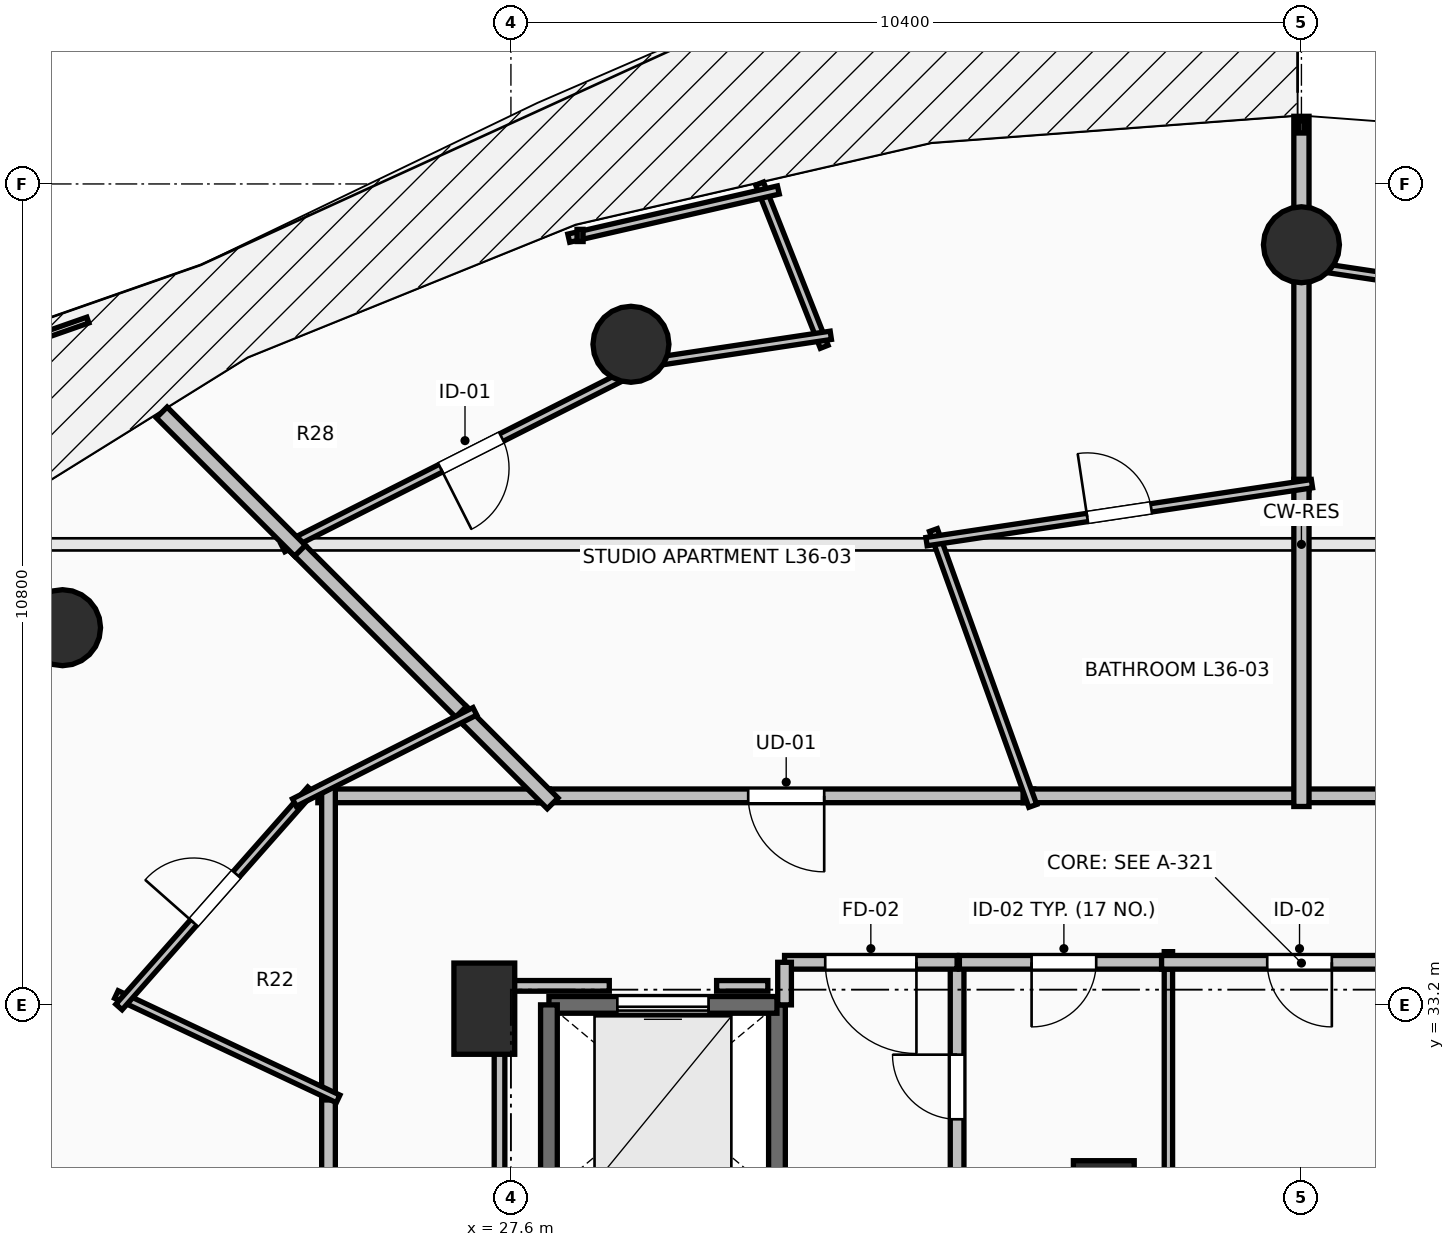
"""IFC4 building model, lengths in metres.
Left out: names, types, materials, properties, quantities, classifications, styles, units other than length and angle.
Written with IfcOpenShell. Run it as: python <this file> out.ifc"""

import sys

from ifc_helpers import new_model, si_unit, direction, frame, frame_2d, origin, origin_2d, place, context, subcontext, project, spatial, rectangle, circle, extrude, element, fill, save


model = new_model("IFC4")
c1 = context("Model", 3, precision=1e-05, world=origin(), true_north=direction((0.0, 1.0)))
c2 = subcontext(c1, "Body", "Model", "MODEL_VIEW")
j1 = project(units=[si_unit("LENGTHUNIT", "METRE"), si_unit("PLANEANGLEUNIT", "RADIAN")], contexts=[c1])
p1 = place(None, origin())
s1 = spatial("IfcSite", under=j1, at=p1, CompositionType="ELEMENT")
p2 = place(p1, origin())
s2 = spatial("IfcBuilding", under=s1, at=p2, CompositionType="ELEMENT")
p3 = place(p2, frame((0.0, 0.0, 136.1)))
s3 = spatial("IfcBuildingStorey", under=s2, at=p3, CompositionType="ELEMENT", Elevation=136.1)
for number, where, z_axis, x_axis in (
    (1, (38.0, 43.2, 0.0), (0.0, 0.0, 1.0), (0.0, 1.0, 0.0)),
    (2, (29.179, 41.891, 0.0), (0.0, 0.0, 1.0), (-0.383, 0.924, 0.0)),
    (3, (21.701, 38.162, 0.0), (0.0, 0.0, 1.0), (-0.707, 0.707, 0.0)),
):
    element("IfcColumn", number, at=place(p3, frame(where, z_axis=z_axis, x_axis=x_axis)), inside=s3, PredefinedType="COLUMN", context=c2, shape_type="SweptSolid", body=[
        extrude(circle(Radius=0.5, at=origin_2d()), origin(), (0.0, 0.0, 1.0), 3.5),
    ])
for number, where, z_axis, x_axis in (
    (4, (27.25, 33.15, 0.0), (0.0, 0.0, 1.0), (1.0, 0.0, 0.0)),
    (5, (35.4, 30.55, 0.0), (0.0, 0.0, 1.0), (1.0, 0.0, 0.0)),
):
    element("IfcColumn", number, at=place(p3, frame(where, z_axis=z_axis, x_axis=x_axis)), inside=s3, PredefinedType="PILASTER", context=c2, shape_type="SweptSolid", body=[
        extrude(rectangle(XDim=0.8, YDim=1.2, at=origin_2d()), origin(), (0.0, 0.0, 1.0), 3.5),
    ])
p4 = place(p3, frame((31.1, 30.7, 0.0), z_axis=(0.0, 0.0, 1.0), x_axis=(0.0, 1.0, 0.0)))
e6 = element("IfcWall", 6, at=p4, inside=s3, PredefinedType="SOLIDWALL", context=c2, shape_type="SweptSolid", body=[
    extrude(rectangle(XDim=2.5, YDim=0.22, at=frame_2d((1.25, 0.0))), origin(), (0.0, 0.0, 1.0), 3.24),
])
p5 = place(p3, frame((31.1, 33.2, 0.0), z_axis=(0.0, 0.0, 1.0), x_axis=(-1.0, 0.0, 0.0)))
e7 = element("IfcWall", 7, at=p5, inside=s3, PredefinedType="SOLIDWALL", context=c2, shape_type="SweptSolid", body=[
    extrude(rectangle(XDim=3.0, YDim=0.22, at=frame_2d((1.5, 0.0))), origin(), (0.0, 0.0, 1.0), 3.24),
])
p6 = place(p5, frame((0.9, 0.0, 0.0)))
e8 = element("IfcOpeningElement", 8, at=p6, cuts=e7, PredefinedType="OPENING", context=c2, shape_type="SweptSolid", body=[
    extrude(rectangle(XDim=1.2, YDim=2.2, at=frame_2d((0.6, 1.1))), frame((0.0, 0.125, 0.0), z_axis=(0.0, -1.0, 0.0), x_axis=(1.0, 0.0, 0.0)), (0.0, 0.0, 1.0), 0.25),
])
p7 = place(p3, frame((28.1, 33.2, 0.0), z_axis=(0.0, 0.0, 1.0), x_axis=(0.0, -1.0, 0.0)))
e9 = element("IfcWall", 9, at=p7, inside=s3, PredefinedType="SOLIDWALL", context=c2, shape_type="SweptSolid", body=[
    extrude(rectangle(XDim=2.5, YDim=0.22, at=frame_2d((1.25, 0.0))), origin(), (0.0, 0.0, 1.0), 3.24),
])
p8 = place(p3, frame((33.47, 30.48, 0.0), z_axis=(0.0, 0.0, 1.0), x_axis=(0.0, 1.0, 0.0)))
e10 = element("IfcWall", 10, at=p8, inside=s3, PredefinedType="PARTITIONING", context=c2, shape_type="SweptSolid", body=[
    extrude(rectangle(XDim=3.28, YDim=0.18, at=frame_2d((1.64, 0.0))), origin(), (0.0, 0.0, 1.0), 3.24),
])
p9 = place(p8, frame((1.215, 0.0, 0.0)))
e11 = element("IfcOpeningElement", 11, at=p9, cuts=e10, PredefinedType="OPENING", context=c2, shape_type="SweptSolid", body=[
    extrude(rectangle(XDim=0.85, YDim=2.1, at=frame_2d((0.425, 1.05))), frame((0.0, 0.105, 0.0), z_axis=(0.0, -1.0, 0.0), x_axis=(1.0, 0.0, 0.0)), (0.0, 0.0, 1.0), 0.21),
])
p10 = place(p3, frame((33.47, 33.76, 0.0), z_axis=(0.0, 0.0, 1.0), x_axis=(-1.0, 0.0, 0.0)))
e12 = element("IfcWall", 12, at=p10, inside=s3, PredefinedType="PARTITIONING", context=c2, shape_type="SweptSolid", body=[
    extrude(rectangle(XDim=2.27, YDim=0.18, at=frame_2d((1.135, 0.0))), origin(), (0.0, 0.0, 1.0), 3.24),
])
p11 = place(p10, frame((0.535, 0.0, 0.0)))
e13 = element("IfcOpeningElement", 13, at=p11, cuts=e12, PredefinedType="OPENING", context=c2, shape_type="SweptSolid", body=[
    extrude(rectangle(XDim=1.2, YDim=2.15, at=frame_2d((0.6, 1.075))), frame((0.0, 0.105, 0.0), z_axis=(0.0, -1.0, 0.0), x_axis=(1.0, 0.0, 0.0)), (0.0, 0.0, 1.0), 0.21),
])
p12 = place(p3, frame((31.2, 33.76, 0.0), z_axis=(0.0, 0.0, 1.0), x_axis=(0.0, -1.0, 0.0)))
e14 = element("IfcWall", 14, at=p12, inside=s3, PredefinedType="PARTITIONING", context=c2, shape_type="SweptSolid", body=[
    extrude(rectangle(XDim=0.56, YDim=0.18, at=frame_2d((0.28, 0.0))), origin(), (0.0, 0.0, 1.0), 3.24),
])
p13 = place(p3, frame((36.25, 30.34, 0.0), z_axis=(0.0, 0.0, 1.0), x_axis=(0.0, 1.0, 0.0)))
e15 = element("IfcWall", 15, at=p13, inside=s3, PredefinedType="PARTITIONING", context=c2, shape_type="SweptSolid", body=[
    extrude(rectangle(XDim=3.56, YDim=0.11, at=frame_2d((1.78, 0.0))), origin(), (0.0, 0.0, 1.0), 2.432),
])
p14 = place(p3, frame((36.25, 33.76, 0.0), z_axis=(0.0, 0.0, 1.0), x_axis=(-1.0, 0.0, 0.0)))
e16 = element("IfcWall", 16, at=p14, inside=s3, PredefinedType="PARTITIONING", context=c2, shape_type="SweptSolid", body=[
    extrude(rectangle(XDim=2.75, YDim=0.18, at=frame_2d((1.375, 0.0))), origin(), (0.0, 0.0, 1.0), 3.24),
])
p15 = place(p14, frame((0.95, 0.0, 0.0)))
e17 = element("IfcOpeningElement", 17, at=p15, cuts=e16, PredefinedType="OPENING", context=c2, shape_type="SweptSolid", body=[
    extrude(rectangle(XDim=0.85, YDim=2.1, at=frame_2d((0.425, 1.05))), frame((0.0, 0.105, 0.0), z_axis=(0.0, -1.0, 0.0), x_axis=(1.0, 0.0, 0.0)), (0.0, 0.0, 1.0), 0.21),
])
p16 = place(p3, frame((39.79, 33.76, 0.0), z_axis=(0.0, 0.0, 1.0), x_axis=(-1.0, 0.0, 0.0)))
e18 = element("IfcWall", 18, at=p16, inside=s3, PredefinedType="PARTITIONING", context=c2, shape_type="SweptSolid", body=[
    extrude(rectangle(XDim=3.63, YDim=0.18, at=frame_2d((1.815, 0.0))), origin(), (0.0, 0.0, 1.0), 3.24),
])
p17 = place(p16, frame((1.39, 0.0, 0.0)))
e19 = element("IfcOpeningElement", 19, at=p17, cuts=e18, PredefinedType="OPENING", context=c2, shape_type="SweptSolid", body=[
    extrude(rectangle(XDim=0.85, YDim=2.1, at=frame_2d((0.425, 1.05))), frame((0.0, 0.105, 0.0), z_axis=(0.0, -1.0, 0.0), x_axis=(1.0, 0.0, 0.0)), (0.0, 0.0, 1.0), 0.21),
])
p18 = place(p3, frame((42.748, 35.95, 0.0), z_axis=(0.0, 0.0, 1.0), x_axis=(-1.0, 0.0, 0.0)))
e20 = element("IfcWall", 20, at=p18, inside=s3, PredefinedType="PARTITIONING", context=c2, shape_type="SweptSolid", body=[
    extrude(rectangle(XDim=4.808, YDim=0.18, at=frame_2d((2.404, 0.0))), origin(), (0.0, 0.0, 1.0), 3.24),
])
p19 = place(p18, frame((1.904, 0.0, 0.0)))
e21 = element("IfcOpeningElement", 21, at=p19, cuts=e20, PredefinedType="OPENING", context=c2, shape_type="SweptSolid", body=[
    extrude(rectangle(XDim=1.0, YDim=2.15, at=frame_2d((0.5, 1.075))), frame((0.0, 0.105, 0.0), z_axis=(0.0, -1.0, 0.0), x_axis=(1.0, 0.0, 0.0)), (0.0, 0.0, 1.0), 0.21),
])
p20 = place(p3, frame((34.478, 35.95, 0.0), z_axis=(0.0, 0.0, 1.0), x_axis=(-1.0, 0.0, 0.0)))
e22 = element("IfcWall", 22, at=p20, inside=s3, PredefinedType="PARTITIONING", context=c2, shape_type="SweptSolid", body=[
    extrude(rectangle(XDim=6.513, YDim=0.18, at=frame_2d((3.256, 0.0))), origin(), (0.0, 0.0, 1.0), 2.432),
])
p21 = place(p20, frame((2.757, 0.0, 0.0)))
e23 = element("IfcOpeningElement", 23, at=p21, cuts=e22, PredefinedType="OPENING", context=c2, shape_type="SweptSolid", body=[
    extrude(rectangle(XDim=1.0, YDim=2.15, at=frame_2d((0.5, 1.075))), frame((0.0, 0.105, 0.0), z_axis=(0.0, -1.0, 0.0), x_axis=(1.0, 0.0, 0.0)), (0.0, 0.0, 1.0), 0.21),
])
p22 = place(p3, frame((38.08, 35.95, 0.0), z_axis=(0.0, 0.0, 1.0), x_axis=(-1.0, 0.0, 0.0)))
e24 = element("IfcWall", 24, at=p22, inside=s3, PredefinedType="PARTITIONING", context=c2, shape_type="SweptSolid", body=[
    extrude(rectangle(XDim=3.742, YDim=0.18, at=frame_2d((1.871, 0.0))), origin(), (0.0, 0.0, 1.0), 3.24),
])
p23 = place(p3, frame((25.2, 32.089, 0.0), z_axis=(0.0, 0.0, 1.0), x_axis=(0.0, -1.0, 0.0)))
e25 = element("IfcWall", 25, at=p23, inside=s3, PredefinedType="PARTITIONING", context=c2, shape_type="SweptSolid", body=[
    extrude(rectangle(XDim=4.839, YDim=0.18, at=frame_2d((2.419, 0.0))), origin(), (0.0, 0.0, 1.0), 2.432),
])
p24 = place(p3, frame((28.105, 35.95, 0.0), z_axis=(0.0, 0.0, 1.0), x_axis=(-1.0, 0.0, 0.0)))
e26 = element("IfcWall", 26, at=p24, inside=s3, PredefinedType="PARTITIONING", context=c2, shape_type="SweptSolid", body=[
    extrude(rectangle(XDim=3.045, YDim=0.18, at=frame_2d((1.522, 0.0))), origin(), (0.0, 0.0, 1.0), 2.432),
])
p25 = place(p3, frame((25.2, 36.09, 0.0), z_axis=(0.0, 0.0, 1.0), x_axis=(0.0, -1.0, 0.0)))
e27 = element("IfcWall", 27, at=p25, inside=s3, PredefinedType="PARTITIONING", context=c2, shape_type="SweptSolid", body=[
    extrude(rectangle(XDim=4.141, YDim=0.18, at=frame_2d((2.071, 0.0))), origin(), (0.0, 0.0, 1.0), 2.432),
])
p26 = place(p3, frame((45.021, 41.884, 0.0), z_axis=(0.0, 0.0, 1.0), x_axis=(-0.988887079739, 0.148668569392, 0.0)))
e28 = element("IfcWall", 28, at=p26, inside=s3, PredefinedType="PARTITIONING", context=c2, shape_type="SweptSolid", body=[
    extrude(rectangle(XDim=7.24, YDim=0.11, at=frame_2d((3.62, 0.0))), origin(), (0.0, 0.0, 1.0), 2.432),
])
p27 = place(p26, frame((3.17, 0.0, 0.0)))
e29 = element("IfcOpeningElement", 29, at=p27, cuts=e28, PredefinedType="OPENING", context=c2, shape_type="SweptSolid", body=[
    extrude(rectangle(XDim=0.9, YDim=2.1, at=frame_2d((0.45, 1.05))), frame((0.0, 0.07, 0.0), z_axis=(0.0, -1.0, 0.0), x_axis=(1.0, 0.0, 0.0)), (0.0, 0.0, 1.0), 0.14),
])
p28 = place(p3, frame((38.0, 42.94, 0.0), z_axis=(0.0, 0.0, 1.0), x_axis=(0.0, -1.0, 0.0)))
e30 = element("IfcWall", 30, at=p28, inside=s3, PredefinedType="PARTITIONING", context=c2, shape_type="SweptSolid", body=[
    extrude(rectangle(XDim=2.965, YDim=0.2, at=frame_2d((1.482, 0.0))), origin(), (0.0, 0.0, 1.0), 2.874),
])
p29 = place(p3, frame((38.0, 40.115, 0.0), z_axis=(0.0, 0.0, 1.0), x_axis=(0.0, -1.0, 0.0)))
e31 = element("IfcWall", 31, at=p29, inside=s3, PredefinedType="PARTITIONING", context=c2, shape_type="SweptSolid", body=[
    extrude(rectangle(XDim=4.305, YDim=0.2, at=frame_2d((2.152, 0.0))), origin(), (0.0, 0.0, 1.0), 2.874),
])
p30 = place(p3, frame((38.0, 44.89, 0.0), z_axis=(0.0, 0.0, 1.0), x_axis=(0.0, -1.0, 0.0)))
e32 = element("IfcWall", 32, at=p30, inside=s3, PredefinedType="PARTITIONING", context=c2, shape_type="SweptSolid", body=[
    extrude(rectangle(XDim=2.09, YDim=0.2, at=frame_2d((1.045, 0.0))), origin(), (0.0, 0.0, 1.0), 3.24),
])
p31 = place(p3, frame((34.465, 35.818, 0.0), z_axis=(0.0, 0.0, 1.0), x_axis=(-0.338813618534, 0.940853512453, 0.0)))
e33 = element("IfcWall", 33, at=p31, inside=s3, PredefinedType="PARTITIONING", context=c2, shape_type="SweptSolid", body=[
    extrude(rectangle(XDim=3.856, YDim=0.11, at=frame_2d((1.928, 0.0))), origin(), (0.0, 0.0, 1.0), 2.432),
])
p32 = place(p3, frame((33.068, 39.294, 0.0), z_axis=(0.0, 0.0, 1.0), x_axis=(0.988876905643, 0.148736227888, 0.0)))
e34 = element("IfcWall", 34, at=p32, inside=s3, PredefinedType="PARTITIONING", context=c2, shape_type="SweptSolid", body=[
    extrude(rectangle(XDim=5.128, YDim=0.11, at=frame_2d((2.564, 0.0))), origin(), (0.0, 0.0, 1.0), 2.432),
])
p33 = place(p32, frame((2.139, 0.0, 0.0)))
e35 = element("IfcOpeningElement", 35, at=p33, cuts=e34, PredefinedType="OPENING", context=c2, shape_type="SweptSolid", body=[
    extrude(rectangle(XDim=0.85, YDim=2.1, at=frame_2d((0.425, 1.05))), frame((0.0, 0.07, 0.0), z_axis=(0.0, -1.0, 0.0), x_axis=(1.0, 0.0, 0.0)), (0.0, 0.0, 1.0), 0.14),
])
p34 = place(p3, frame((30.872, 44.005, 0.0), z_axis=(0.0, 0.0, 1.0), x_axis=(0.368016079814, -0.929819426017, 0.0)))
e36 = element("IfcWall", 36, at=p34, inside=s3, PredefinedType="PARTITIONING", context=c2, shape_type="SweptSolid", body=[
    extrude(rectangle(XDim=2.309, YDim=0.11, at=frame_2d((1.155, 0.0))), origin(), (0.0, 0.0, 1.0), 2.728),
])
p35 = place(p3, frame((31.808, 42.009, 0.0), z_axis=(0.0, 0.0, 1.0), x_axis=(-0.988887788943, -0.148663851958, 0.0)))
e37 = element("IfcWall", 37, at=p35, inside=s3, PredefinedType="PARTITIONING", context=c2, shape_type="SweptSolid", body=[
    extrude(rectangle(XDim=2.547, YDim=0.11, at=frame_2d((1.273, 0.0))), origin(), (0.0, 0.0, 1.0), 3.24),
])
p36 = place(p3, frame((29.553, 41.714, 0.0), z_axis=(0.0, 0.0, 1.0), x_axis=(-0.892438454993, -0.451169152369, 0.0)))
e38 = element("IfcWall", 38, at=p36, inside=s3, PredefinedType="PARTITIONING", context=c2, shape_type="SweptSolid", body=[
    extrude(rectangle(XDim=5.549, YDim=0.11, at=frame_2d((2.774, 0.0))), origin(), (0.0, 0.0, 1.0), 2.432),
])
p37 = place(p36, frame((2.324, 0.0, 0.0)))
e39 = element("IfcOpeningElement", 39, at=p37, cuts=e38, PredefinedType="OPENING", context=c2, shape_type="SweptSolid", body=[
    extrude(rectangle(XDim=0.9, YDim=2.1, at=frame_2d((0.45, 1.05))), frame((0.0, 0.07, 0.0), z_axis=(0.0, -1.0, 0.0), x_axis=(1.0, 0.0, 0.0)), (0.0, 0.0, 1.0), 0.14),
])
p38 = place(p3, frame((31.118, 43.92, 0.0), z_axis=(0.0, 0.0, 1.0), x_axis=(-0.974594373263, -0.223977247963, 0.0)))
e40 = element("IfcWall", 40, at=p38, inside=s3, PredefinedType="PARTITIONING", context=c2, shape_type="SweptSolid", body=[
    extrude(rectangle(XDim=2.83, YDim=0.11, at=frame_2d((1.415, 0.0))), origin(), (0.0, 0.0, 1.0), 3.24),
])
p39 = place(p3, frame((24.726, 39.274, 0.0), z_axis=(0.0, 0.0, 1.0), x_axis=(0.707106781187, -0.707106781187, 0.0)))
e41 = element("IfcWall", 41, at=p39, inside=s3, PredefinedType="PARTITIONING", context=c2, shape_type="SweptSolid", body=[
    extrude(rectangle(XDim=3.277, YDim=0.2, at=frame_2d((1.638, 0.0))), origin(), (0.0, 0.0, 1.0), 2.874),
])
p40 = place(p3, frame((26.944, 37.056, 0.0), z_axis=(0.0, 0.0, 1.0), x_axis=(0.707106781187, -0.707106781187, 0.0)))
e42 = element("IfcWall", 42, at=p40, inside=s3, PredefinedType="PARTITIONING", context=c2, shape_type="SweptSolid", body=[
    extrude(rectangle(XDim=1.704, YDim=0.2, at=frame_2d((0.852, 0.0))), origin(), (0.0, 0.0, 1.0), 2.432),
])
p41 = place(p3, frame((23.006, 40.994, 0.0), z_axis=(0.0, 0.0, 1.0), x_axis=(0.707106781187, -0.707106781187, 0.0)))
e43 = element("IfcWall", 43, at=p41, inside=s3, PredefinedType="PARTITIONING", context=c2, shape_type="SweptSolid", body=[
    extrude(rectangle(XDim=2.572, YDim=0.2, at=frame_2d((1.286, 0.0))), origin(), (0.0, 0.0, 1.0), 2.728),
])
p42 = place(p3, frame((25.327, 31.963, 0.0), z_axis=(0.0, 0.0, 1.0), x_axis=(-0.904775800467, 0.425888190596, 0.0)))
e44 = element("IfcWall", 44, at=p42, inside=s3, PredefinedType="PARTITIONING", context=c2, shape_type="SweptSolid", body=[
    extrude(rectangle(XDim=3.225, YDim=0.11, at=frame_2d((1.612, 0.0))), origin(), (0.0, 0.0, 1.0), 2.922),
])
p43 = place(p3, frame((22.443, 33.172, 0.0), z_axis=(0.0, 0.0, 1.0), x_axis=(0.662199468358, 0.749327607997, 0.0)))
e45 = element("IfcWall", 45, at=p43, inside=s3, PredefinedType="PARTITIONING", context=c2, shape_type="SweptSolid", body=[
    extrude(rectangle(XDim=3.814, YDim=0.11, at=frame_2d((1.907, 0.0))), origin(), (0.0, 0.0, 1.0), 2.432),
])
p44 = place(p43, frame((1.482, 0.0, 0.0)))
e46 = element("IfcOpeningElement", 46, at=p44, cuts=e45, PredefinedType="OPENING", context=c2, shape_type="SweptSolid", body=[
    extrude(rectangle(XDim=0.85, YDim=2.1, at=frame_2d((0.425, 1.05))), frame((0.0, 0.07, 0.0), z_axis=(0.0, -1.0, 0.0), x_axis=(1.0, 0.0, 0.0)), (0.0, 0.0, 1.0), 0.14),
])
p45 = place(p3, frame((24.751, 35.862, 0.0), z_axis=(0.0, 0.0, 1.0), x_axis=(0.892455114256, 0.451136197882, 0.0)))
e47 = element("IfcWall", 47, at=p45, inside=s3, PredefinedType="PARTITIONING", context=c2, shape_type="SweptSolid", body=[
    extrude(rectangle(XDim=2.661, YDim=0.11, at=frame_2d((1.331, 0.0))), origin(), (0.0, 0.0, 1.0), 3.24),
])
p46 = place(p3, frame((30.98, 33.45, 0.0), z_axis=(0.0, 0.0, 1.0), x_axis=(-1.0, 0.0, 0.0)))
e48 = element("IfcWall", 48, at=p46, inside=s3, PredefinedType="PARTITIONING", context=c2, shape_type="SweptSolid", body=[
    extrude(rectangle(XDim=0.674, YDim=0.14, at=frame_2d((0.337, 0.0))), origin(), (0.0, 0.0, 1.0), 3.24),
])
p47 = place(p3, frame((28.894, 33.45, 0.0), z_axis=(0.0, 0.0, 1.0), x_axis=(-1.0, 0.0, 0.0)))
e49 = element("IfcWall", 49, at=p47, inside=s3, PredefinedType="PARTITIONING", context=c2, shape_type="SweptSolid", body=[
    extrude(rectangle(XDim=1.444, YDim=0.14, at=frame_2d((0.722, 0.0))), origin(), (0.0, 0.0, 1.0), 2.432),
])
p48 = place(p3, frame((27.45, 33.45, 0.0), z_axis=(0.0, 0.0, 1.0), x_axis=(0.0, -1.0, 0.0)))
e50 = element("IfcWall", 50, at=p48, inside=s3, PredefinedType="PARTITIONING", context=c2, shape_type="SweptSolid", body=[
    extrude(rectangle(XDim=5.254, YDim=0.14, at=frame_2d((2.627, 0.0))), origin(), (0.0, 0.0, 1.0), 2.432),
])
p49 = place(p6, origin())
e51 = element("IfcDoor", 51, at=p49, inside=s3, OperationType="SLIDING_TO_LEFT", PredefinedType="DOOR", context=c2, shape_type="SweptSolid", body=[
    extrude(rectangle(XDim=1.2, YDim=2.2, at=frame_2d((0.6, 1.1))), frame((0.0, 0.025, 0.0), z_axis=(0.0, -1.0, 0.0), x_axis=(1.0, 0.0, 0.0)), (0.0, 0.0, 1.0), 0.05),
])
fill(e8, e51)
p50 = place(p9, origin())
e52 = element("IfcDoor", 52, at=p50, inside=s3, OperationType="SINGLE_SWING_RIGHT", PredefinedType="DOOR", context=c2, shape_type="SweptSolid", body=[
    extrude(rectangle(XDim=0.85, YDim=2.1, at=frame_2d((0.425, 1.05))), frame((0.0, 0.025, 0.0), z_axis=(0.0, -1.0, 0.0), x_axis=(1.0, 0.0, 0.0)), (0.0, 0.0, 1.0), 0.05),
])
fill(e11, e52)
p51 = place(p11, origin())
e53 = element("IfcDoor", 53, at=p51, inside=s3, OperationType="SINGLE_SWING_LEFT", PredefinedType="DOOR", context=c2, shape_type="SweptSolid", body=[
    extrude(rectangle(XDim=1.2, YDim=2.15, at=frame_2d((0.6, 1.075))), frame((0.0, 0.025, 0.0), z_axis=(0.0, -1.0, 0.0), x_axis=(1.0, 0.0, 0.0)), (0.0, 0.0, 1.0), 0.05),
])
fill(e13, e53)
p52 = place(p15, origin())
e54 = element("IfcDoor", 54, at=p52, inside=s3, OperationType="SINGLE_SWING_RIGHT", PredefinedType="DOOR", context=c2, shape_type="SweptSolid", body=[
    extrude(rectangle(XDim=0.85, YDim=2.1, at=frame_2d((0.425, 1.05))), frame((0.0, 0.025, 0.0), z_axis=(0.0, -1.0, 0.0), x_axis=(1.0, 0.0, 0.0)), (0.0, 0.0, 1.0), 0.05),
])
fill(e17, e54)
p53 = place(p17, origin())
e55 = element("IfcDoor", 55, at=p53, inside=s3, OperationType="SINGLE_SWING_LEFT", PredefinedType="DOOR", context=c2, shape_type="SweptSolid", body=[
    extrude(rectangle(XDim=0.85, YDim=2.1, at=frame_2d((0.425, 1.05))), frame((0.0, 0.025, 0.0), z_axis=(0.0, -1.0, 0.0), x_axis=(1.0, 0.0, 0.0)), (0.0, 0.0, 1.0), 0.05),
])
fill(e19, e55)
p54 = place(p21, origin())
e56 = element("IfcDoor", 56, at=p54, inside=s3, OperationType="SINGLE_SWING_LEFT", PredefinedType="DOOR", context=c2, shape_type="SweptSolid", body=[
    extrude(rectangle(XDim=1.0, YDim=2.15, at=frame_2d((0.5, 1.075))), frame((0.0, 0.025, 0.0), z_axis=(0.0, -1.0, 0.0), x_axis=(1.0, 0.0, 0.0)), (0.0, 0.0, 1.0), 0.05),
])
fill(e23, e56)
p55 = place(p33, origin())
e57 = element("IfcDoor", 57, at=p55, inside=s3, OperationType="SINGLE_SWING_LEFT", PredefinedType="DOOR", context=c2, shape_type="SweptSolid", body=[
    extrude(rectangle(XDim=0.85, YDim=2.1, at=frame_2d((0.425, 1.05))), frame((0.0, 0.025, 0.0), z_axis=(0.0, -1.0, 0.0), x_axis=(1.0, 0.0, 0.0)), (0.0, 0.0, 1.0), 0.05),
])
fill(e35, e57)
p56 = place(p37, origin())
e58 = element("IfcDoor", 58, at=p56, inside=s3, OperationType="SINGLE_SWING_RIGHT", PredefinedType="DOOR", context=c2, shape_type="SweptSolid", body=[
    extrude(rectangle(XDim=0.9, YDim=2.1, at=frame_2d((0.45, 1.05))), frame((0.0, 0.025, 0.0), z_axis=(0.0, -1.0, 0.0), x_axis=(1.0, 0.0, 0.0)), (0.0, 0.0, 1.0), 0.05),
])
fill(e39, e58)
p57 = place(p44, origin())
e59 = element("IfcDoor", 59, at=p57, inside=s3, OperationType="SINGLE_SWING_LEFT", PredefinedType="DOOR", context=c2, shape_type="SweptSolid", body=[
    extrude(rectangle(XDim=0.85, YDim=2.1, at=frame_2d((0.425, 1.05))), frame((0.0, 0.025, 0.0), z_axis=(0.0, -1.0, 0.0), x_axis=(1.0, 0.0, 0.0)), (0.0, 0.0, 1.0), 0.05),
])
fill(e46, e59)
save(model, sys.argv[1])
